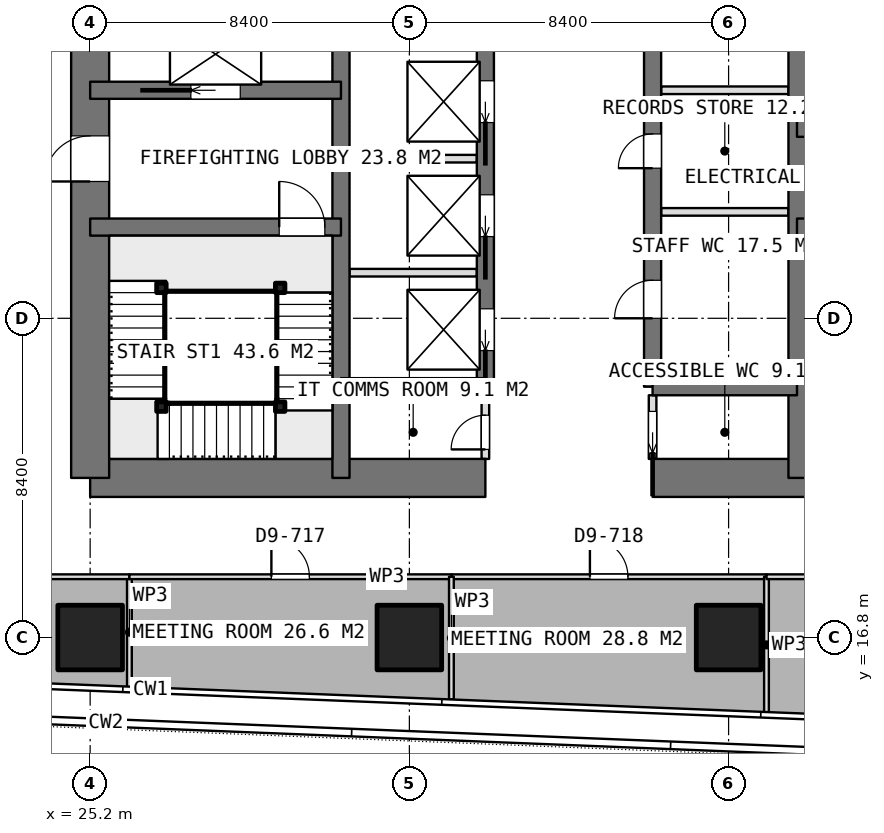
"""IFC4 building model, lengths in metres.
Left out: names, types, materials, properties, quantities, classifications, styles, units other than length and angle.
Written with IfcOpenShell. Run it as: python <this file> out.ifc"""

import sys

from ifc_helpers import new_model, si_unit, direction, frame, frame_2d, origin, origin_2d, place, context, subcontext, project, spatial, rectangle, extrude, element, fill, save


model = new_model("IFC4")
c1 = context("Model", 3, precision=1e-05, world=origin(), true_north=direction((0.0, 1.0)))
c2 = subcontext(c1, "Body", "Model", "MODEL_VIEW")
j1 = project(units=[si_unit("LENGTHUNIT", "METRE"), si_unit("PLANEANGLEUNIT", "RADIAN")], contexts=[c1])
p1 = place(None, origin())
s1 = spatial("IfcSite", under=j1, at=p1, CompositionType="ELEMENT")
p2 = place(p1, origin())
s2 = spatial("IfcBuilding", under=s1, at=p2, CompositionType="ELEMENT")
p3 = place(p2, frame((0.0, 0.0, 183.95)))
s3 = spatial("IfcBuildingStorey", under=s2, at=p3, CompositionType="ELEMENT", Elevation=183.95)
p4 = place(p3, frame((25.2, 21.0, 0.0), z_axis=(0.0, 0.0, 1.0), x_axis=(1.0, 0.0, 0.0)))
e1 = element("IfcWall", 1, at=p4, inside=s3, PredefinedType="SHEAR", context=c2, shape_type="SweptSolid", body=[
    extrude(rectangle(XDim=10.4, YDim=1.0, at=frame_2d((5.2, 0.0))), origin(), (0.0, 0.0, 1.0), 3.75),
])
p5 = place(p3, frame((40.0, 21.0, 0.0), z_axis=(0.0, 0.0, 1.0), x_axis=(1.0, 0.0, 0.0)))
e2 = element("IfcWall", 2, at=p5, inside=s3, PredefinedType="SHEAR", context=c2, shape_type="SweptSolid", body=[
    extrude(rectangle(XDim=10.4, YDim=1.0, at=frame_2d((5.2, 0.0))), origin(), (0.0, 0.0, 1.0), 3.75),
])
p6 = place(p3, frame((25.2, 21.0, 0.0), z_axis=(0.0, 0.0, 1.0), x_axis=(0.0, 1.0, 0.0)))
e3 = element("IfcWall", 3, at=p6, inside=s3, PredefinedType="SHEAR", context=c2, shape_type="SweptSolid", body=[
    extrude(rectangle(XDim=25.2, YDim=1.0, at=frame_2d((12.6, 0.0))), origin(), (0.0, 0.0, 1.0), 3.75),
])
p7 = place(p6, frame((7.8, 0.0, 0.0)))
e4 = element("IfcOpeningElement", 4, at=p7, cuts=e3, PredefinedType="OPENING", context=c2, shape_type="SweptSolid", body=[
    extrude(rectangle(XDim=1.2, YDim=2.1, at=frame_2d((0.6, 1.05))), frame((0.0, 0.51, 0.0), z_axis=(0.0, -1.0, 0.0), x_axis=(1.0, 0.0, 0.0)), (0.0, 0.0, 1.0), 1.02),
])
p8 = place(p6, frame((14.25, 0.0, 0.0)))
e5 = element("IfcOpeningElement", 5, at=p8, cuts=e3, PredefinedType="OPENING", context=c2, shape_type="SweptSolid", body=[
    extrude(rectangle(XDim=0.9, YDim=2.1, at=frame_2d((0.45, 1.05))), frame((0.0, 0.51, 0.0), z_axis=(0.0, -1.0, 0.0), x_axis=(1.0, 0.0, 0.0)), (0.0, 0.0, 1.0), 1.02),
])
p9 = place(p6, frame((16.85, 0.0, 0.0)))
e6 = element("IfcOpeningElement", 6, at=p9, cuts=e3, PredefinedType="OPENING", context=c2, shape_type="SweptSolid", body=[
    extrude(rectangle(XDim=0.9, YDim=2.1, at=frame_2d((0.45, 1.05))), frame((0.0, 0.51, 0.0), z_axis=(0.0, -1.0, 0.0), x_axis=(1.0, 0.0, 0.0)), (0.0, 0.0, 1.0), 1.02),
])
p10 = place(p6, frame((19.025, 0.0, 0.0)))
e7 = element("IfcOpeningElement", 7, at=p10, cuts=e3, PredefinedType="OPENING", context=c2, shape_type="SweptSolid", body=[
    extrude(rectangle(XDim=1.2, YDim=2.1, at=frame_2d((0.6, 1.05))), frame((0.0, 0.51, 0.0), z_axis=(0.0, -1.0, 0.0), x_axis=(1.0, 0.0, 0.0)), (0.0, 0.0, 1.0), 1.02),
])
for number, where, z_axis, x_axis in (
    (8, (31.8, 21.0, 0.0), (0.0, 0.0, 1.0), (0.0, 1.0, 0.0)),
    (9, (43.8, 21.0, 0.0), (0.0, 0.0, 1.0), (0.0, 1.0, 0.0)),
):
    element("IfcWall", number, at=place(p3, frame(where, z_axis=z_axis, x_axis=x_axis)), inside=s3, PredefinedType="SHEAR", context=c2, shape_type="SweptSolid", body=[
        extrude(rectangle(XDim=25.2, YDim=0.45, at=frame_2d((12.6, 0.0))), origin(), (0.0, 0.0, 1.0), 3.75),
    ])
p11 = place(p3, frame((35.6, 23.4, 0.0), z_axis=(0.0, 0.0, 1.0), x_axis=(0.0, 1.0, 0.0)))
e10 = element("IfcWall", 10, at=p11, inside=s3, PredefinedType="SHEAR", context=c2, shape_type="SweptSolid", body=[
    extrude(rectangle(XDim=18.0, YDim=0.45, at=frame_2d((9.0, 0.0))), origin(), (0.0, 0.0, 1.0), 3.75),
])
p12 = place(p11, frame((0.95, 0.0, 0.0)))
e11 = element("IfcOpeningElement", 11, at=p12, cuts=e10, PredefinedType="OPENING", context=c2, shape_type="SweptSolid", body=[
    extrude(rectangle(XDim=1.1, YDim=2.1, at=frame_2d((0.55, 1.05))), frame((0.0, 0.235, 0.0), z_axis=(0.0, -1.0, 0.0), x_axis=(1.0, 0.0, 0.0)), (0.0, 0.0, 1.0), 0.47),
])
p13 = place(p11, frame((3.95, 0.0, 0.0)))
e12 = element("IfcOpeningElement", 12, at=p13, cuts=e10, PredefinedType="OPENING", context=c2, shape_type="SweptSolid", body=[
    extrude(rectangle(XDim=1.1, YDim=2.1, at=frame_2d((0.55, 1.05))), frame((0.0, 0.235, 0.0), z_axis=(0.0, -1.0, 0.0), x_axis=(1.0, 0.0, 0.0)), (0.0, 0.0, 1.0), 0.47),
])
p14 = place(p11, frame((6.95, 0.0, 0.0)))
e13 = element("IfcOpeningElement", 13, at=p14, cuts=e10, PredefinedType="OPENING", context=c2, shape_type="SweptSolid", body=[
    extrude(rectangle(XDim=1.1, YDim=2.1, at=frame_2d((0.55, 1.05))), frame((0.0, 0.235, 0.0), z_axis=(0.0, -1.0, 0.0), x_axis=(1.0, 0.0, 0.0)), (0.0, 0.0, 1.0), 0.47),
])
p15 = place(p11, frame((9.95, 0.0, 0.0)))
e14 = element("IfcOpeningElement", 14, at=p15, cuts=e10, PredefinedType="OPENING", context=c2, shape_type="SweptSolid", body=[
    extrude(rectangle(XDim=1.1, YDim=2.1, at=frame_2d((0.55, 1.05))), frame((0.0, 0.235, 0.0), z_axis=(0.0, -1.0, 0.0), x_axis=(1.0, 0.0, 0.0)), (0.0, 0.0, 1.0), 0.47),
])
p16 = place(p11, frame((12.95, 0.0, 0.0)))
e15 = element("IfcOpeningElement", 15, at=p16, cuts=e10, PredefinedType="OPENING", context=c2, shape_type="SweptSolid", body=[
    extrude(rectangle(XDim=1.1, YDim=2.1, at=frame_2d((0.55, 1.05))), frame((0.0, 0.235, 0.0), z_axis=(0.0, -1.0, 0.0), x_axis=(1.0, 0.0, 0.0)), (0.0, 0.0, 1.0), 0.47),
])
p17 = place(p11, frame((15.95, 0.0, 0.0)))
e16 = element("IfcOpeningElement", 16, at=p17, cuts=e10, PredefinedType="OPENING", context=c2, shape_type="SweptSolid", body=[
    extrude(rectangle(XDim=1.1, YDim=2.1, at=frame_2d((0.55, 1.05))), frame((0.0, 0.235, 0.0), z_axis=(0.0, -1.0, 0.0), x_axis=(1.0, 0.0, 0.0)), (0.0, 0.0, 1.0), 0.47),
])
p18 = place(p3, frame((40.0, 23.4, 0.0), z_axis=(0.0, 0.0, 1.0), x_axis=(0.0, 1.0, 0.0)))
e17 = element("IfcWall", 17, at=p18, inside=s3, PredefinedType="SHEAR", context=c2, shape_type="SweptSolid", body=[
    extrude(rectangle(XDim=18.0, YDim=0.45, at=frame_2d((9.0, 0.0))), origin(), (0.0, 0.0, 1.0), 3.75),
])
p19 = place(p18, frame((1.8, 0.0, 0.0)))
e18 = element("IfcOpeningElement", 18, at=p19, cuts=e17, PredefinedType="OPENING", context=c2, shape_type="SweptSolid", body=[
    extrude(rectangle(XDim=1.0, YDim=2.1, at=frame_2d((0.5, 1.05))), frame((0.0, 0.235, 0.0), z_axis=(0.0, -1.0, 0.0), x_axis=(1.0, 0.0, 0.0)), (0.0, 0.0, 1.0), 0.47),
])
p20 = place(p18, frame((5.75, 0.0, 0.0)))
e19 = element("IfcOpeningElement", 19, at=p20, cuts=e17, PredefinedType="OPENING", context=c2, shape_type="SweptSolid", body=[
    extrude(rectangle(XDim=0.9, YDim=2.1, at=frame_2d((0.45, 1.05))), frame((0.0, 0.235, 0.0), z_axis=(0.0, -1.0, 0.0), x_axis=(1.0, 0.0, 0.0)), (0.0, 0.0, 1.0), 0.47),
])
p21 = place(p18, frame((9.4, 0.0, 0.0)))
e20 = element("IfcOpeningElement", 20, at=p21, cuts=e17, PredefinedType="OPENING", context=c2, shape_type="SweptSolid", body=[
    extrude(rectangle(XDim=1.0, YDim=2.1, at=frame_2d((0.5, 1.05))), frame((0.0, 0.235, 0.0), z_axis=(0.0, -1.0, 0.0), x_axis=(1.0, 0.0, 0.0)), (0.0, 0.0, 1.0), 0.47),
])
for number, where, z_axis, x_axis in (
    (21, (31.8, 23.4, 0.0), (0.0, 0.0, 1.0), (1.0, 0.0, 0.0)),
    (22, (40.0, 23.4, 0.0), (0.0, 0.0, 1.0), (1.0, 0.0, 0.0)),
):
    element("IfcWall", number, at=place(p3, frame(where, z_axis=z_axis, x_axis=x_axis)), inside=s3, PredefinedType="SHEAR", context=c2, shape_type="SweptSolid", body=[
        extrude(rectangle(XDim=3.8, YDim=0.45, at=frame_2d((1.9, 0.0))), origin(), (0.0, 0.0, 1.0), 3.75),
    ])
p22 = place(p3, frame((25.2, 27.6, 0.0), z_axis=(0.0, 0.0, 1.0), x_axis=(1.0, 0.0, 0.0)))
e23 = element("IfcWall", 23, at=p22, inside=s3, PredefinedType="SHEAR", context=c2, shape_type="SweptSolid", body=[
    extrude(rectangle(XDim=6.6, YDim=0.45, at=frame_2d((3.3, 0.0))), origin(), (0.0, 0.0, 1.0), 3.75),
])
p23 = place(p22, frame((4.975, 0.0, 0.0)))
e24 = element("IfcOpeningElement", 24, at=p23, cuts=e23, PredefinedType="OPENING", context=c2, shape_type="SweptSolid", body=[
    extrude(rectangle(XDim=1.2, YDim=2.1, at=frame_2d((0.6, 1.05))), frame((0.0, 0.235, 0.0), z_axis=(0.0, -1.0, 0.0), x_axis=(1.0, 0.0, 0.0)), (0.0, 0.0, 1.0), 0.47),
])
p24 = place(p3, frame((25.2, 31.2, 0.0), z_axis=(0.0, 0.0, 1.0), x_axis=(1.0, 0.0, 0.0)))
e25 = element("IfcWall", 25, at=p24, inside=s3, PredefinedType="SHEAR", context=c2, shape_type="SweptSolid", body=[
    extrude(rectangle(XDim=6.6, YDim=0.45, at=frame_2d((3.3, 0.0))), origin(), (0.0, 0.0, 1.0), 3.75),
])
p25 = place(p24, frame((2.65, 0.0, 0.0)))
e26 = element("IfcOpeningElement", 26, at=p25, cuts=e25, PredefinedType="OPENING", context=c2, shape_type="SweptSolid", body=[
    extrude(rectangle(XDim=1.3, YDim=2.1, at=frame_2d((0.65, 1.05))), frame((0.0, 0.235, 0.0), z_axis=(0.0, -1.0, 0.0), x_axis=(1.0, 0.0, 0.0)), (0.0, 0.0, 1.0), 0.47),
])
for number, where, z_axis, x_axis in (
    (27, (43.8, 27.6, 0.0), (0.0, 0.0, 1.0), (1.0, 0.0, 0.0)),
    (28, (43.8, 30.2, 0.0), (0.0, 0.0, 1.0), (1.0, 0.0, 0.0)),
):
    element("IfcWall", number, at=place(p3, frame(where, z_axis=z_axis, x_axis=x_axis)), inside=s3, PredefinedType="SHEAR", context=c2, shape_type="SweptSolid", body=[
        extrude(rectangle(XDim=6.6, YDim=0.45, at=frame_2d((3.3, 0.0))), origin(), (0.0, 0.0, 1.0), 3.75),
    ])
for number, where, z_axis, x_axis in (
    (29, (25.2, 16.8, 0.0), (0.0, 0.0, 1.0), (1.0, 0.0, 0.0)),
    (30, (33.6, 16.8, 0.0), (0.0, 0.0, 1.0), (1.0, 0.0, 0.0)),
    (31, (42.0, 16.8, 0.0), (0.0, 0.0, 1.0), (1.0, 0.0, 0.0)),
):
    element("IfcColumn", number, at=place(p3, frame(where, z_axis=z_axis, x_axis=x_axis)), inside=s3, PredefinedType="COLUMN", context=c2, shape_type="SweptSolid", body=[
        extrude(rectangle(XDim=1.7, YDim=1.7, at=origin_2d()), origin(), (0.0, 0.0, 1.0), 3.75),
    ])
for number, where, z_axis, x_axis in (
    (32, (32.025, 26.4, 0.0), (0.0, 0.0, 1.0), (1.0, 0.0, 0.0)),
    (33, (32.025, 29.4, 0.0), (0.0, 0.0, 1.0), (1.0, 0.0, 0.0)),
):
    element("IfcWall", number, at=place(p3, frame(where, z_axis=z_axis, x_axis=x_axis)), inside=s3, PredefinedType="PARTITIONING", context=c2, shape_type="SweptSolid", body=[
        extrude(rectangle(XDim=3.35, YDim=0.2, at=frame_2d((1.675, 0.0))), origin(), (0.0, 0.0, 1.0), 3.5),
    ])
p26 = place(p3, frame((40.0, 21.5, 0.0), z_axis=(0.0, 0.0, 1.0), x_axis=(0.0, 1.0, 0.0)))
e34 = element("IfcWall", 34, at=p26, inside=s3, PredefinedType="PARTITIONING", context=c2, shape_type="SweptSolid", body=[
    extrude(rectangle(XDim=1.675, YDim=0.2, at=frame_2d((0.837, 0.0))), origin(), (0.0, 0.0, 1.0), 3.5),
])
p27 = place(p26, frame((0.15, 0.0, 0.0)))
e35 = element("IfcOpeningElement", 35, at=p27, cuts=e34, PredefinedType="OPENING", context=c2, shape_type="SweptSolid", body=[
    extrude(rectangle(XDim=1.1, YDim=2.1, at=frame_2d((0.55, 1.05))), frame((0.0, 0.11, 0.0), z_axis=(0.0, -1.0, 0.0), x_axis=(1.0, 0.0, 0.0)), (0.0, 0.0, 1.0), 0.22),
])
p28 = place(p3, frame((35.6, 21.5, 0.0), z_axis=(0.0, 0.0, 1.0), x_axis=(0.0, 1.0, 0.0)))
e36 = element("IfcWall", 36, at=p28, inside=s3, PredefinedType="PARTITIONING", context=c2, shape_type="SweptSolid", body=[
    extrude(rectangle(XDim=1.675, YDim=0.2, at=frame_2d((0.837, 0.0))), origin(), (0.0, 0.0, 1.0), 3.5),
])
p29 = place(p28, frame((0.25, 0.0, 0.0)))
e37 = element("IfcOpeningElement", 37, at=p29, cuts=e36, PredefinedType="OPENING", context=c2, shape_type="SweptSolid", body=[
    extrude(rectangle(XDim=0.9, YDim=2.1, at=frame_2d((0.45, 1.05))), frame((0.0, 0.11, 0.0), z_axis=(0.0, -1.0, 0.0), x_axis=(1.0, 0.0, 0.0)), (0.0, 0.0, 1.0), 0.22),
])
for number, where, z_axis, x_axis in (
    (38, (40.225, 28.0, 0.0), (0.0, 0.0, 1.0), (1.0, 0.0, 0.0)),
    (39, (40.225, 31.2, 0.0), (0.0, 0.0, 1.0), (1.0, 0.0, 0.0)),
):
    element("IfcWall", number, at=place(p3, frame(where, z_axis=z_axis, x_axis=x_axis)), inside=s3, PredefinedType="PARTITIONING", context=c2, shape_type="SweptSolid", body=[
        extrude(rectangle(XDim=3.35, YDim=0.2, at=frame_2d((1.675, 0.0))), origin(), (0.0, 0.0, 1.0), 3.5),
    ])
p30 = place(p3, frame((34.706, 18.4, 0.0), z_axis=(0.0, 0.0, 1.0), x_axis=(1.0, 0.0, 0.0)))
e40 = element("IfcWall", 40, at=p30, inside=s3, PredefinedType="PARTITIONING", context=c2, shape_type="SweptSolid", body=[
    extrude(rectangle(XDim=8.291, YDim=0.125, at=frame_2d((4.146, 0.0))), origin(), (0.0, 0.0, 1.0), 3.5),
])
p31 = place(p30, frame((3.645, 0.0, 0.0)))
e41 = element("IfcOpeningElement", 41, at=p31, cuts=e40, PredefinedType="OPENING", context=c2, shape_type="SweptSolid", body=[
    extrude(rectangle(XDim=1.0, YDim=2.1, at=frame_2d((0.5, 1.05))), frame((0.0, 0.073, 0.0), z_axis=(0.0, -1.0, 0.0), x_axis=(1.0, 0.0, 0.0)), (0.0, 0.0, 1.0), 0.145),
])
p32 = place(p3, frame((42.997, 18.4, 0.0), z_axis=(0.0, 0.0, 1.0), x_axis=(0.0, -1.0, 0.0)))
e42 = element("IfcWall", 42, at=p32, inside=s3, PredefinedType="PARTITIONING", context=c2, shape_type="SweptSolid", body=[
    extrude(rectangle(XDim=3.586, YDim=0.125, at=frame_2d((1.793, 0.0))), origin(), (0.0, 0.0, 1.0), 3.5),
])
p33 = place(p3, frame((34.706, 15.175, 0.0), z_axis=(0.0, 0.0, 1.0), x_axis=(0.0, 1.0, 0.0)))
e43 = element("IfcWall", 43, at=p33, inside=s3, PredefinedType="PARTITIONING", context=c2, shape_type="SweptSolid", body=[
    extrude(rectangle(XDim=3.225, YDim=0.125, at=frame_2d((1.612, 0.0))), origin(), (0.0, 0.0, 1.0), 3.5),
])
p34 = place(p3, frame((42.998, 18.4, 0.0), z_axis=(0.0, 0.0, 1.0), x_axis=(1.0, 0.0, 0.0)))
e44 = element("IfcWall", 44, at=p34, inside=s3, PredefinedType="PARTITIONING", context=c2, shape_type="SweptSolid", body=[
    extrude(rectangle(XDim=8.466, YDim=0.125, at=frame_2d((4.233, 0.0))), origin(), (0.0, 0.0, 1.0), 3.5),
])
p35 = place(p34, frame((3.733, 0.0, 0.0)))
e45 = element("IfcOpeningElement", 45, at=p35, cuts=e44, PredefinedType="OPENING", context=c2, shape_type="SweptSolid", body=[
    extrude(rectangle(XDim=1.0, YDim=2.1, at=frame_2d((0.5, 1.05))), frame((0.0, 0.073, 0.0), z_axis=(0.0, -1.0, 0.0), x_axis=(1.0, 0.0, 0.0)), (0.0, 0.0, 1.0), 0.145),
])
p36 = place(p3, frame((26.233, 18.4, 0.0), z_axis=(0.0, 0.0, 1.0), x_axis=(0.0, -1.0, 0.0)))
e46 = element("IfcWall", 46, at=p36, inside=s3, PredefinedType="PARTITIONING", context=c2, shape_type="SweptSolid", body=[
    extrude(rectangle(XDim=2.917, YDim=0.125, at=frame_2d((1.458, 0.0))), origin(), (0.0, 0.0, 1.0), 3.5),
])
p37 = place(p3, frame((19.2, 18.4, 0.0), z_axis=(0.0, 0.0, 1.0), x_axis=(1.0, 0.0, 0.0)))
e47 = element("IfcWall", 47, at=p37, inside=s3, PredefinedType="PARTITIONING", context=c2, shape_type="SweptSolid", body=[
    extrude(rectangle(XDim=7.033, YDim=0.125, at=frame_2d((3.517, 0.0))), origin(), (0.0, 0.0, 1.0), 3.5),
])
p38 = place(p37, frame((3.017, 0.0, 0.0)))
e48 = element("IfcOpeningElement", 48, at=p38, cuts=e47, PredefinedType="OPENING", context=c2, shape_type="SweptSolid", body=[
    extrude(rectangle(XDim=1.0, YDim=2.1, at=frame_2d((0.5, 1.05))), frame((0.0, 0.073, 0.0), z_axis=(0.0, -1.0, 0.0), x_axis=(1.0, 0.0, 0.0)), (0.0, 0.0, 1.0), 0.145),
])
p39 = place(p3, frame((26.233, 18.4, 0.0), z_axis=(0.0, 0.0, 1.0), x_axis=(1.0, 0.0, 0.0)))
e49 = element("IfcWall", 49, at=p39, inside=s3, PredefinedType="PARTITIONING", context=c2, shape_type="SweptSolid", body=[
    extrude(rectangle(XDim=8.472, YDim=0.125, at=frame_2d((4.236, 0.0))), origin(), (0.0, 0.0, 1.0), 3.5),
])
p40 = place(p39, frame((3.736, 0.0, 0.0)))
e50 = element("IfcOpeningElement", 50, at=p40, cuts=e49, PredefinedType="OPENING", context=c2, shape_type="SweptSolid", body=[
    extrude(rectangle(XDim=1.0, YDim=2.1, at=frame_2d((0.5, 1.05))), frame((0.0, 0.073, 0.0), z_axis=(0.0, -1.0, 0.0), x_axis=(1.0, 0.0, 0.0)), (0.0, 0.0, 1.0), 0.145),
])
for number, where, z_axis, x_axis in (
    (51, (30.2, 26.0, 0.0), (0.0, 0.0, 1.0), (1.0, 0.0, 0.0)),
    (52, (30.2, 22.875, 0.0), (0.0, 0.0, 1.0), (1.0, 0.0, 0.0)),
    (53, (27.075, 22.875, 0.0), (0.0, 0.0, 1.0), (1.0, 0.0, 0.0)),
    (54, (27.075, 26.0, 0.0), (0.0, 0.0, 1.0), (1.0, 0.0, 0.0)),
):
    element("IfcColumn", number, at=place(p3, frame(where, z_axis=z_axis, x_axis=x_axis)), inside=s3, PredefinedType="COLUMN", context=c2, shape_type="SweptSolid", body=[
        extrude(rectangle(XDim=0.25, YDim=0.25, at=origin_2d()), origin(), (0.0, 0.0, 1.0), 3.75),
    ])
p41 = place(p7, origin())
e55 = element("IfcDoor", 55, at=p41, inside=s3, OperationType="SINGLE_SWING_LEFT", PredefinedType="DOOR", context=c2, shape_type="SweptSolid", body=[
    extrude(rectangle(XDim=1.2, YDim=2.1, at=frame_2d((0.6, 1.05))), frame((0.0, 0.025, 0.0), z_axis=(0.0, -1.0, 0.0), x_axis=(1.0, 0.0, 0.0)), (0.0, 0.0, 1.0), 0.05),
])
fill(e4, e55)
p42 = place(p27, origin())
e56 = element("IfcDoor", 56, at=p42, inside=s3, OperationType="SLIDING_TO_LEFT", PredefinedType="DOOR", context=c2, shape_type="SweptSolid", body=[
    extrude(rectangle(XDim=1.1, YDim=2.1, at=frame_2d((0.55, 1.05))), frame((0.0, 0.025, 0.0), z_axis=(0.0, -1.0, 0.0), x_axis=(1.0, 0.0, 0.0)), (0.0, 0.0, 1.0), 0.05),
])
fill(e35, e56)
p43 = place(p29, origin())
e57 = element("IfcDoor", 57, at=p43, inside=s3, OperationType="SINGLE_SWING_LEFT", PredefinedType="DOOR", context=c2, shape_type="SweptSolid", body=[
    extrude(rectangle(XDim=0.9, YDim=2.1, at=frame_2d((0.45, 1.05))), frame((0.0, 0.025, 0.0), z_axis=(0.0, -1.0, 0.0), x_axis=(1.0, 0.0, 0.0)), (0.0, 0.0, 1.0), 0.05),
])
fill(e37, e57)
p44 = place(p19, origin())
e58 = element("IfcDoor", 58, at=p44, inside=s3, OperationType="SINGLE_SWING_LEFT", PredefinedType="DOOR", context=c2, shape_type="SweptSolid", body=[
    extrude(rectangle(XDim=1.0, YDim=2.1, at=frame_2d((0.5, 1.05))), frame((0.0, 0.025, 0.0), z_axis=(0.0, -1.0, 0.0), x_axis=(1.0, 0.0, 0.0)), (0.0, 0.0, 1.0), 0.05),
])
fill(e18, e58)
p45 = place(p20, origin())
e59 = element("IfcDoor", 59, at=p45, inside=s3, OperationType="SINGLE_SWING_LEFT", PredefinedType="DOOR", context=c2, shape_type="SweptSolid", body=[
    extrude(rectangle(XDim=0.9, YDim=2.1, at=frame_2d((0.45, 1.05))), frame((0.0, 0.025, 0.0), z_axis=(0.0, -1.0, 0.0), x_axis=(1.0, 0.0, 0.0)), (0.0, 0.0, 1.0), 0.05),
])
fill(e19, e59)
p46 = place(p12, origin())
e60 = element("IfcDoor", 60, at=p46, inside=s3, OperationType="SLIDING_TO_LEFT", PredefinedType="USERDEFINED", context=c2, shape_type="SweptSolid", body=[
    extrude(rectangle(XDim=1.1, YDim=2.1, at=frame_2d((0.55, 1.05))), frame((0.0, 0.025, 0.0), z_axis=(0.0, -1.0, 0.0), x_axis=(1.0, 0.0, 0.0)), (0.0, 0.0, 1.0), 0.05),
])
fill(e11, e60)
p47 = place(p13, origin())
e61 = element("IfcDoor", 61, at=p47, inside=s3, OperationType="SLIDING_TO_LEFT", PredefinedType="USERDEFINED", context=c2, shape_type="SweptSolid", body=[
    extrude(rectangle(XDim=1.1, YDim=2.1, at=frame_2d((0.55, 1.05))), frame((0.0, 0.025, 0.0), z_axis=(0.0, -1.0, 0.0), x_axis=(1.0, 0.0, 0.0)), (0.0, 0.0, 1.0), 0.05),
])
fill(e12, e61)
p48 = place(p14, origin())
e62 = element("IfcDoor", 62, at=p48, inside=s3, OperationType="SLIDING_TO_LEFT", PredefinedType="USERDEFINED", context=c2, shape_type="SweptSolid", body=[
    extrude(rectangle(XDim=1.1, YDim=2.1, at=frame_2d((0.55, 1.05))), frame((0.0, 0.025, 0.0), z_axis=(0.0, -1.0, 0.0), x_axis=(1.0, 0.0, 0.0)), (0.0, 0.0, 1.0), 0.05),
])
fill(e13, e62)
p49 = place(p25, origin())
e63 = element("IfcDoor", 63, at=p49, inside=s3, OperationType="SLIDING_TO_LEFT", PredefinedType="USERDEFINED", context=c2, shape_type="SweptSolid", body=[
    extrude(rectangle(XDim=1.3, YDim=2.1, at=frame_2d((0.65, 1.05))), frame((0.0, 0.025, 0.0), z_axis=(0.0, -1.0, 0.0), x_axis=(1.0, 0.0, 0.0)), (0.0, 0.0, 1.0), 0.05),
])
fill(e26, e63)
p50 = place(p31, origin())
e64 = element("IfcDoor", 64, at=p50, inside=s3, OperationType="SINGLE_SWING_LEFT", PredefinedType="DOOR", context=c2, shape_type="SweptSolid", body=[
    extrude(rectangle(XDim=1.0, YDim=2.1, at=frame_2d((0.5, 1.05))), frame((0.0, 0.025, 0.0), z_axis=(0.0, -1.0, 0.0), x_axis=(1.0, 0.0, 0.0)), (0.0, 0.0, 1.0), 0.05),
])
fill(e41, e64)
p51 = place(p40, origin())
e65 = element("IfcDoor", 65, at=p51, inside=s3, OperationType="SINGLE_SWING_LEFT", PredefinedType="DOOR", context=c2, shape_type="SweptSolid", body=[
    extrude(rectangle(XDim=1.0, YDim=2.1, at=frame_2d((0.5, 1.05))), frame((0.0, 0.025, 0.0), z_axis=(0.0, -1.0, 0.0), x_axis=(1.0, 0.0, 0.0)), (0.0, 0.0, 1.0), 0.05),
])
fill(e50, e65)
p52 = place(p23, origin())
e66 = element("IfcDoor", 66, at=p52, inside=s3, OperationType="SINGLE_SWING_RIGHT", PredefinedType="DOOR", context=c2, shape_type="SweptSolid", body=[
    extrude(rectangle(XDim=1.2, YDim=2.1, at=frame_2d((0.6, 1.05))), frame((0.0, 0.025, 0.0), z_axis=(0.0, -1.0, 0.0), x_axis=(1.0, 0.0, 0.0)), (0.0, 0.0, 1.0), 0.05),
])
fill(e24, e66)
save(model, sys.argv[1])
